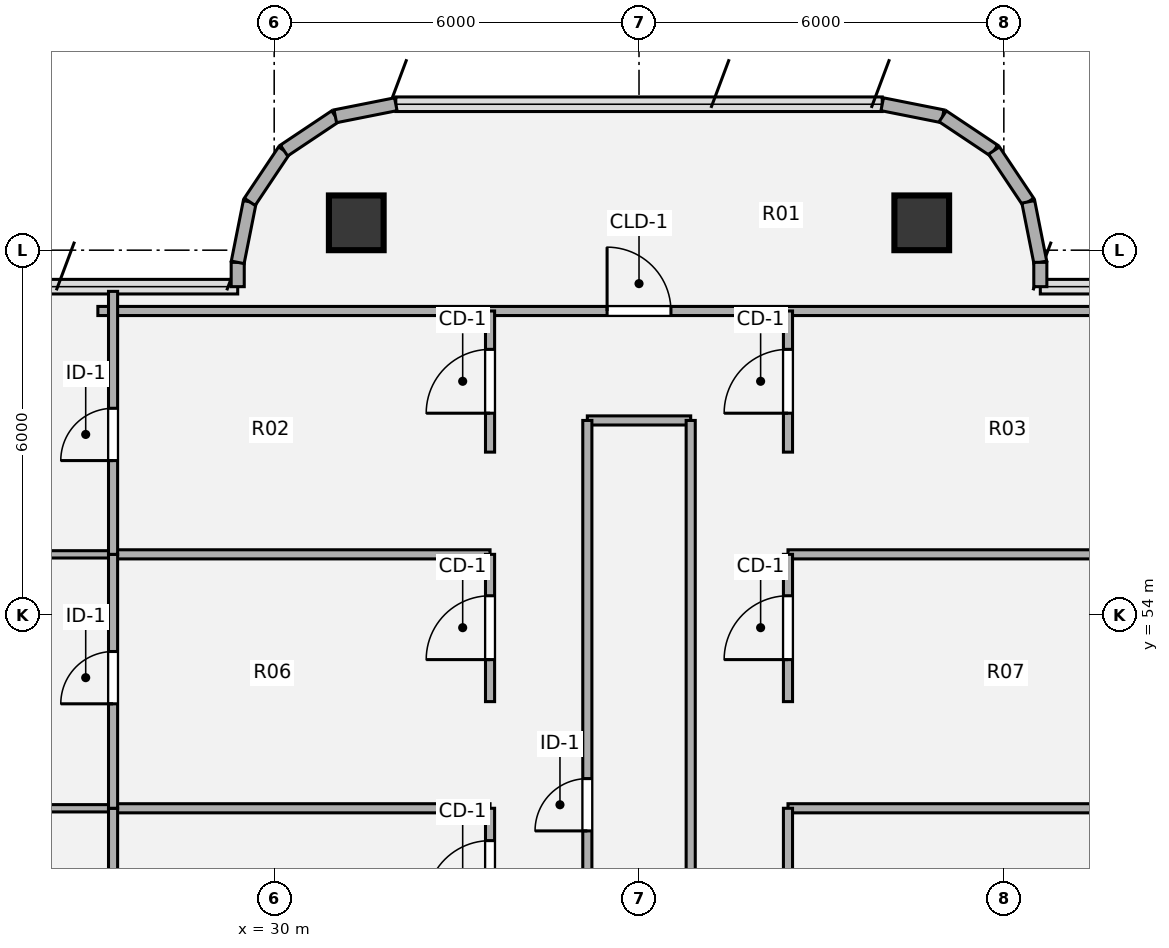
"""IFC4 building model, lengths in metres.
Left out: names, types, materials, properties, quantities, classifications, styles, units other than length and angle.
Written with IfcOpenShell. Run it as: python <this file> out.ifc"""

import sys

from ifc_helpers import new_model, si_unit, direction, frame, frame_2d, origin, origin_2d, place, context, subcontext, project, spatial, rectangle, hollow_circle, extrude, source, transform, mapped, element, fill, save


model = new_model("IFC4")
c1 = context("Model", 3, precision=1e-05, world=origin(), true_north=direction((0.0, 1.0)))
c2 = subcontext(c1, "Body", "Model", "MODEL_VIEW")
j1 = project(units=[si_unit("LENGTHUNIT", "METRE"), si_unit("PLANEANGLEUNIT", "RADIAN")], contexts=[c1])
p1 = place(None, origin())
s1 = spatial("IfcSite", under=j1, at=p1, CompositionType="ELEMENT")
p2 = place(p1, origin())
s2 = spatial("IfcBuilding", under=s1, at=p2, CompositionType="ELEMENT")
p3 = place(p2, frame((0.0, 0.0, 260.82)))
s3 = spatial("IfcBuildingStorey", under=s2, at=p3, CompositionType="ELEMENT", Elevation=260.82)
m1 = source(origin(), c2, "Body", "SweptSolid", [
    extrude(hollow_circle(Radius=0.45, WallThickness=0.032, at=origin_2d()), origin(), (0.0, 0.0, 1.0), 3.78),
])
for number, where, z_axis, x_axis in (
    (1, (31.35, 60.45, 0.0), (0.0, 0.0, 1.0), (1.0, 0.0, 0.0)),
    (2, (40.65, 60.45, 0.0), (0.0, 0.0, 1.0), (1.0, 0.0, 0.0)),
):
    element("IfcColumn", number, at=place(p3, frame(where, z_axis=z_axis, x_axis=x_axis)), inside=s3, PredefinedType="COLUMN", context=c2, shape_type="MappedRepresentation", body=[
        mapped(m1, transform((0.0, 0.0, 0.0), x_axis=(1.0, 0.0, 0.0), y_axis=(0.0, 1.0, 0.0), z_axis=(0.0, 0.0, 1.0), scale=1.0)),
    ])
p4 = place(p3, frame((29.4, 59.4, 0.0), z_axis=(0.0, 0.0, 1.0), x_axis=(0.0, 1.0, 0.0)))
e3 = element("IfcWall", 3, at=p4, inside=s3, PredefinedType="SOLIDWALL", context=c2, shape_type="SweptSolid", body=[
    extrude(rectangle(XDim=0.4, YDim=0.215, at=frame_2d((0.2, 0.0))), origin(), (0.0, 0.0, 1.0), 3.53),
])
p5 = place(p3, frame((29.4, 59.8, 0.0), z_axis=(0.0, 0.0, 1.0), x_axis=(0.195190360752, 0.980765376158, 0.0)))
e4 = element("IfcWall", 4, at=p5, inside=s3, PredefinedType="SOLIDWALL", context=c2, shape_type="SweptSolid", body=[
    extrude(rectangle(XDim=1.014, YDim=0.215, at=frame_2d((0.507, 0.0))), origin(), (0.0, 0.0, 1.0), 3.53),
])
p6 = place(p3, frame((29.598, 60.795, 0.0), z_axis=(0.0, 0.0, 1.0), x_axis=(0.555643898837, 0.831420385657, 0.0)))
e5 = element("IfcWall", 5, at=p6, inside=s3, PredefinedType="SOLIDWALL", context=c2, shape_type="SweptSolid", body=[
    extrude(rectangle(XDim=1.015, YDim=0.215, at=frame_2d((0.507, 0.0))), origin(), (0.0, 0.0, 1.0), 3.53),
])
p7 = place(p3, frame((30.162, 61.638, 0.0), z_axis=(0.0, 0.0, 1.0), x_axis=(0.831346067305, 0.555755086685, 0.0)))
e6 = element("IfcWall", 6, at=p7, inside=s3, PredefinedType="SOLIDWALL", context=c2, shape_type="SweptSolid", body=[
    extrude(rectangle(XDim=1.014, YDim=0.215, at=frame_2d((0.507, 0.0))), origin(), (0.0, 0.0, 1.0), 3.53),
])
for number, where, z_axis, x_axis in (
    (7, (31.005, 62.202, 0.0), (0.0, 0.0, 1.0), (0.981, 0.195, 0.0)),
    (8, (40.0, 62.4, 0.0), (0.0, 0.0, 1.0), (0.981, -0.195, 0.0)),
):
    element("IfcWall", number, at=place(p3, frame(where, z_axis=z_axis, x_axis=x_axis)), inside=s3, PredefinedType="SOLIDWALL", context=c2, shape_type="SweptSolid", body=[
        extrude(rectangle(XDim=1.015, YDim=0.215, at=frame_2d((0.507, 0.0))), origin(), (0.0, 0.0, 1.0), 3.53),
    ])
p8 = place(p3, frame((40.995, 62.202, 0.0), z_axis=(0.0, 0.0, 1.0), x_axis=(0.831346067305, -0.555755086685, 0.0)))
e9 = element("IfcWall", 9, at=p8, inside=s3, PredefinedType="SOLIDWALL", context=c2, shape_type="SweptSolid", body=[
    extrude(rectangle(XDim=1.014, YDim=0.215, at=frame_2d((0.507, 0.0))), origin(), (0.0, 0.0, 1.0), 3.53),
])
p9 = place(p3, frame((41.838, 61.638, 0.0), z_axis=(0.0, 0.0, 1.0), x_axis=(0.555643898837, -0.831420385657, 0.0)))
e10 = element("IfcWall", 10, at=p9, inside=s3, PredefinedType="SOLIDWALL", context=c2, shape_type="SweptSolid", body=[
    extrude(rectangle(XDim=1.015, YDim=0.215, at=frame_2d((0.507, 0.0))), origin(), (0.0, 0.0, 1.0), 3.53),
])
p10 = place(p3, frame((42.402, 60.795, 0.0), z_axis=(0.0, 0.0, 1.0), x_axis=(0.195190360752, -0.980765376158, 0.0)))
e11 = element("IfcWall", 11, at=p10, inside=s3, PredefinedType="SOLIDWALL", context=c2, shape_type="SweptSolid", body=[
    extrude(rectangle(XDim=1.014, YDim=0.215, at=frame_2d((0.507, 0.0))), origin(), (0.0, 0.0, 1.0), 3.53),
])
p11 = place(p3, frame((42.6, 59.8, 0.0), z_axis=(0.0, 0.0, 1.0), x_axis=(0.0, -1.0, 0.0)))
e12 = element("IfcWall", 12, at=p11, inside=s3, PredefinedType="SOLIDWALL", context=c2, shape_type="SweptSolid", body=[
    extrude(rectangle(XDim=0.4, YDim=0.215, at=frame_2d((0.2, 0.0))), origin(), (0.0, 0.0, 1.0), 3.53),
])
p12 = place(p3, frame((17.78, 50.822, 0.0), z_axis=(0.0, 0.0, 1.0), x_axis=(1.0, 0.0, 0.0)))
e13 = element("IfcWall", 13, at=p12, inside=s3, PredefinedType="PARTITIONING", context=c2, shape_type="SweptSolid", body=[
    extrude(rectangle(XDim=9.57, YDim=0.12, at=frame_2d((4.785, 0.0))), origin(), (0.0, 0.0, 1.0), 2.982),
])
p13 = place(p3, frame((27.35, 50.822, 0.0), z_axis=(0.0, 0.0, 1.0), x_axis=(1.0, 0.0, 0.0)))
e14 = element("IfcWall", 14, at=p13, inside=s3, PredefinedType="PARTITIONING", context=c2, shape_type="SweptSolid", body=[
    extrude(rectangle(XDim=6.2, YDim=0.15, at=frame_2d((3.1, 0.0))), origin(), (0.0, 0.0, 1.0), 2.982),
])
p14 = place(p3, frame((38.45, 50.822, 0.0), z_axis=(0.0, 0.0, 1.0), x_axis=(1.0, 0.0, 0.0)))
e15 = element("IfcWall", 15, at=p14, inside=s3, PredefinedType="PARTITIONING", context=c2, shape_type="SweptSolid", body=[
    extrude(rectangle(XDim=15.77, YDim=0.15, at=frame_2d((7.885, 0.0))), origin(), (0.0, 0.0, 1.0), 2.982),
])
p15 = place(p3, frame((17.78, 54.998, 0.0), z_axis=(0.0, 0.0, 1.0), x_axis=(1.0, 0.0, 0.0)))
e16 = element("IfcWall", 16, at=p15, inside=s3, PredefinedType="PARTITIONING", context=c2, shape_type="SweptSolid", body=[
    extrude(rectangle(XDim=9.57, YDim=0.12, at=frame_2d((4.785, 0.0))), origin(), (0.0, 0.0, 1.0), 3.5),
])
for number, where, z_axis, x_axis in (
    (17, (27.35, 54.998, 0.0), (0.0, 0.0, 1.0), (1.0, 0.0, 0.0)),
    (18, (38.45, 54.998, 0.0), (0.0, 0.0, 1.0), (1.0, 0.0, 0.0)),
):
    element("IfcWall", number, at=place(p3, frame(where, z_axis=z_axis, x_axis=x_axis)), inside=s3, PredefinedType="PARTITIONING", context=c2, shape_type="SweptSolid", body=[
        extrude(rectangle(XDim=6.2, YDim=0.15, at=frame_2d((3.1, 0.0))), origin(), (0.0, 0.0, 1.0), 3.259),
    ])
p16 = place(p3, frame((35.15, 57.2, 0.0), z_axis=(0.0, 0.0, 1.0), x_axis=(1.0, 0.0, 0.0)))
e19 = element("IfcWall", 19, at=p16, inside=s3, PredefinedType="PARTITIONING", context=c2, shape_type="SweptSolid", body=[
    extrude(rectangle(XDim=1.7, YDim=0.15, at=frame_2d((0.85, 0.0))), origin(), (0.0, 0.0, 1.0), 3.308),
])
p17 = place(p3, frame((27.1, 59.0, 0.0), z_axis=(0.0, 0.0, 1.0), x_axis=(1.0, 0.0, 0.0)))
e20 = element("IfcWall", 20, at=p17, inside=s3, PredefinedType="PARTITIONING", context=c2, shape_type="SweptSolid", body=[
    extrude(rectangle(XDim=17.8, YDim=0.15, at=frame_2d((8.9, 0.0))), origin(), (0.0, 0.0, 1.0), 3.308),
])
p18 = place(p17, frame((8.375, 0.0, 0.0)))
e21 = element("IfcOpeningElement", 21, at=p18, cuts=e20, PredefinedType="OPENING", context=c2, shape_type="SweptSolid", body=[
    extrude(rectangle(XDim=1.05, YDim=2.1, at=origin_2d()), frame((0.525, 0.085, 1.05), z_axis=(0.0, -1.0, 0.0), x_axis=(1.0, 0.0, 0.0)), (0.0, 0.0, 1.0), 0.17),
])
p19 = place(p3, frame((27.35, 46.298, 0.0), z_axis=(0.0, 0.0, 1.0), x_axis=(0.0, 1.0, 0.0)))
e22 = element("IfcWall", 22, at=p19, inside=s3, PredefinedType="PARTITIONING", context=c2, shape_type="SweptSolid", body=[
    extrude(rectangle(XDim=4.524, YDim=0.15, at=frame_2d((2.262, 0.0))), origin(), (0.0, 0.0, 1.0), 3.5),
])
p20 = place(p19, frame((1.742, 0.0, 0.0)))
e23 = element("IfcOpeningElement", 23, at=p20, cuts=e22, PredefinedType="OPENING", context=c2, shape_type="SweptSolid", body=[
    extrude(rectangle(XDim=0.86, YDim=2.1, at=origin_2d()), frame((0.43, 0.085, 1.05), z_axis=(0.0, -1.0, 0.0), x_axis=(1.0, 0.0, 0.0)), (0.0, 0.0, 1.0), 0.17),
])
p21 = place(p3, frame((27.35, 50.822, 0.0), z_axis=(0.0, 0.0, 1.0), x_axis=(0.0, 1.0, 0.0)))
e24 = element("IfcWall", 24, at=p21, inside=s3, PredefinedType="PARTITIONING", context=c2, shape_type="SweptSolid", body=[
    extrude(rectangle(XDim=4.176, YDim=0.15, at=frame_2d((2.088, 0.0))), origin(), (0.0, 0.0, 1.0), 3.5),
])
p22 = place(p21, frame((1.718, 0.0, 0.0)))
e25 = element("IfcOpeningElement", 25, at=p22, cuts=e24, PredefinedType="OPENING", context=c2, shape_type="SweptSolid", body=[
    extrude(rectangle(XDim=0.86, YDim=2.1, at=origin_2d()), frame((0.43, 0.085, 1.05), z_axis=(0.0, -1.0, 0.0), x_axis=(1.0, 0.0, 0.0)), (0.0, 0.0, 1.0), 0.17),
])
p23 = place(p3, frame((27.35, 54.998, 0.0), z_axis=(0.0, 0.0, 1.0), x_axis=(0.0, 1.0, 0.0)))
e26 = element("IfcWall", 26, at=p23, inside=s3, PredefinedType="PARTITIONING", context=c2, shape_type="SweptSolid", body=[
    extrude(rectangle(XDim=4.324, YDim=0.15, at=frame_2d((2.162, 0.0))), origin(), (0.0, 0.0, 1.0), 3.5),
])
p24 = place(p23, frame((1.542, 0.0, 0.0)))
e27 = element("IfcOpeningElement", 27, at=p24, cuts=e26, PredefinedType="OPENING", context=c2, shape_type="SweptSolid", body=[
    extrude(rectangle(XDim=0.86, YDim=2.1, at=origin_2d()), frame((0.43, 0.085, 1.05), z_axis=(0.0, -1.0, 0.0), x_axis=(1.0, 0.0, 0.0)), (0.0, 0.0, 1.0), 0.17),
])
p25 = place(p3, frame((33.55, 48.698, 0.0), z_axis=(0.0, 0.0, 1.0), x_axis=(0.0, 1.0, 0.0)))
e28 = element("IfcWall", 28, at=p25, inside=s3, PredefinedType="PARTITIONING", context=c2, shape_type="SweptSolid", body=[
    extrude(rectangle(XDim=2.124, YDim=0.15, at=frame_2d((1.062, 0.0))), origin(), (0.0, 0.0, 1.0), 3.5),
])
p26 = place(p25, frame((0.542, 0.0, 0.0)))
e29 = element("IfcOpeningElement", 29, at=p26, cuts=e28, PredefinedType="OPENING", context=c2, shape_type="SweptSolid", body=[
    extrude(rectangle(XDim=1.05, YDim=2.1, at=origin_2d()), frame((0.525, 0.085, 1.05), z_axis=(0.0, -1.0, 0.0), x_axis=(1.0, 0.0, 0.0)), (0.0, 0.0, 1.0), 0.17),
])
p27 = place(p3, frame((33.55, 52.576, 0.0), z_axis=(0.0, 0.0, 1.0), x_axis=(0.0, 1.0, 0.0)))
e30 = element("IfcWall", 30, at=p27, inside=s3, PredefinedType="PARTITIONING", context=c2, shape_type="SweptSolid", body=[
    extrude(rectangle(XDim=2.422, YDim=0.15, at=frame_2d((1.211, 0.0))), origin(), (0.0, 0.0, 1.0), 3.5),
])
p28 = place(p27, frame((0.691, 0.0, 0.0)))
e31 = element("IfcOpeningElement", 31, at=p28, cuts=e30, PredefinedType="OPENING", context=c2, shape_type="SweptSolid", body=[
    extrude(rectangle(XDim=1.05, YDim=2.1, at=origin_2d()), frame((0.525, 0.085, 1.05), z_axis=(0.0, -1.0, 0.0), x_axis=(1.0, 0.0, 0.0)), (0.0, 0.0, 1.0), 0.17),
])
p29 = place(p3, frame((33.55, 56.679, 0.0), z_axis=(0.0, 0.0, 1.0), x_axis=(0.0, 1.0, 0.0)))
e32 = element("IfcWall", 32, at=p29, inside=s3, PredefinedType="PARTITIONING", context=c2, shape_type="SweptSolid", body=[
    extrude(rectangle(XDim=2.321, YDim=0.15, at=frame_2d((1.161, 0.0))), origin(), (0.0, 0.0, 1.0), 3.5),
])
p30 = place(p29, frame((0.64, 0.0, 0.0)))
e33 = element("IfcOpeningElement", 33, at=p30, cuts=e32, PredefinedType="OPENING", context=c2, shape_type="SweptSolid", body=[
    extrude(rectangle(XDim=1.05, YDim=2.1, at=origin_2d()), frame((0.525, 0.085, 1.05), z_axis=(0.0, -1.0, 0.0), x_axis=(1.0, 0.0, 0.0)), (0.0, 0.0, 1.0), 0.17),
])
p31 = place(p3, frame((35.15, 44.62, 0.0), z_axis=(0.0, 0.0, 1.0), x_axis=(0.0, 1.0, 0.0)))
e34 = element("IfcWall", 34, at=p31, inside=s3, PredefinedType="PARTITIONING", context=c2, shape_type="SweptSolid", body=[
    extrude(rectangle(XDim=12.58, YDim=0.15, at=frame_2d((6.29, 0.0))), origin(), (0.0, 0.0, 1.0), 3.5),
])
p32 = place(p31, frame((5.83, 0.0, 0.0)))
e35 = element("IfcOpeningElement", 35, at=p32, cuts=e34, PredefinedType="OPENING", context=c2, shape_type="SweptSolid", body=[
    extrude(rectangle(XDim=0.86, YDim=2.1, at=origin_2d()), frame((0.43, 0.085, 1.05), z_axis=(0.0, -1.0, 0.0), x_axis=(1.0, 0.0, 0.0)), (0.0, 0.0, 1.0), 0.17),
])
p33 = place(p3, frame((36.85, 44.62, 0.0), z_axis=(0.0, 0.0, 1.0), x_axis=(0.0, 1.0, 0.0)))
e36 = element("IfcWall", 36, at=p33, inside=s3, PredefinedType="PARTITIONING", context=c2, shape_type="SweptSolid", body=[
    extrude(rectangle(XDim=12.58, YDim=0.15, at=frame_2d((6.29, 0.0))), origin(), (0.0, 0.0, 1.0), 3.5),
])
p34 = place(p3, frame((38.45, 46.298, 0.0), z_axis=(0.0, 0.0, 1.0), x_axis=(0.0, 1.0, 0.0)))
e37 = element("IfcWall", 37, at=p34, inside=s3, PredefinedType="PARTITIONING", context=c2, shape_type="SweptSolid", body=[
    extrude(rectangle(XDim=4.524, YDim=0.15, at=frame_2d((2.262, 0.0))), origin(), (0.0, 0.0, 1.0), 3.5),
])
p35 = place(p34, frame((1.737, 0.0, 0.0)))
e38 = element("IfcOpeningElement", 38, at=p35, cuts=e37, PredefinedType="OPENING", context=c2, shape_type="SweptSolid", body=[
    extrude(rectangle(XDim=1.05, YDim=2.1, at=origin_2d()), frame((0.525, 0.085, 1.05), z_axis=(0.0, -1.0, 0.0), x_axis=(1.0, 0.0, 0.0)), (0.0, 0.0, 1.0), 0.17),
])
p36 = place(p3, frame((38.45, 52.576, 0.0), z_axis=(0.0, 0.0, 1.0), x_axis=(0.0, 1.0, 0.0)))
e39 = element("IfcWall", 39, at=p36, inside=s3, PredefinedType="PARTITIONING", context=c2, shape_type="SweptSolid", body=[
    extrude(rectangle(XDim=2.422, YDim=0.15, at=frame_2d((1.211, 0.0))), origin(), (0.0, 0.0, 1.0), 3.5),
])
p37 = place(p36, frame((0.691, 0.0, 0.0)))
e40 = element("IfcOpeningElement", 40, at=p37, cuts=e39, PredefinedType="OPENING", context=c2, shape_type="SweptSolid", body=[
    extrude(rectangle(XDim=1.05, YDim=2.1, at=origin_2d()), frame((0.525, 0.085, 1.05), z_axis=(0.0, -1.0, 0.0), x_axis=(1.0, 0.0, 0.0)), (0.0, 0.0, 1.0), 0.17),
])
p38 = place(p3, frame((38.45, 56.679, 0.0), z_axis=(0.0, 0.0, 1.0), x_axis=(0.0, 1.0, 0.0)))
e41 = element("IfcWall", 41, at=p38, inside=s3, PredefinedType="PARTITIONING", context=c2, shape_type="SweptSolid", body=[
    extrude(rectangle(XDim=2.321, YDim=0.15, at=frame_2d((1.161, 0.0))), origin(), (0.0, 0.0, 1.0), 3.5),
])
p39 = place(p38, frame((0.64, 0.0, 0.0)))
e42 = element("IfcOpeningElement", 42, at=p39, cuts=e41, PredefinedType="OPENING", context=c2, shape_type="SweptSolid", body=[
    extrude(rectangle(XDim=1.05, YDim=2.1, at=origin_2d()), frame((0.525, 0.085, 1.05), z_axis=(0.0, -1.0, 0.0), x_axis=(1.0, 0.0, 0.0)), (0.0, 0.0, 1.0), 0.17),
])
m2 = source(origin(), c2, "Body", "SweptSolid", [
    extrude(rectangle(XDim=1.05, YDim=2.1, at=origin_2d()), frame((0.525, 0.025, 1.05), z_axis=(0.0, -1.0, 0.0), x_axis=(1.0, 0.0, 0.0)), (0.0, 0.0, 1.0), 0.05),
])
p40 = place(p18, origin())
e43 = element("IfcDoor", 43, at=p40, inside=s3, OperationType="SINGLE_SWING_LEFT", PredefinedType="DOOR", context=c2, shape_type="MappedRepresentation", body=[
    mapped(m2, transform((0.0, 0.0, 0.0), x_axis=(1.0, 0.0, 0.0), y_axis=(0.0, 1.0, 0.0), z_axis=(0.0, 0.0, 1.0), scale=1.0)),
])
fill(e21, e43)
m3 = source(origin(), c2, "Body", "SweptSolid", [
    extrude(rectangle(XDim=0.86, YDim=2.1, at=origin_2d()), frame((0.43, 0.025, 1.05), z_axis=(0.0, -1.0, 0.0), x_axis=(1.0, 0.0, 0.0)), (0.0, 0.0, 1.0), 0.05),
])
p41 = place(p22, origin())
e44 = element("IfcDoor", 44, at=p41, inside=s3, OperationType="SINGLE_SWING_LEFT", PredefinedType="DOOR", context=c2, shape_type="MappedRepresentation", body=[
    mapped(m3, transform((0.0, 0.0, 0.0), x_axis=(1.0, 0.0, 0.0), y_axis=(0.0, 1.0, 0.0), z_axis=(0.0, 0.0, 1.0), scale=1.0)),
])
fill(e25, e44)
p42 = place(p24, origin())
e45 = element("IfcDoor", 45, at=p42, inside=s3, OperationType="SINGLE_SWING_LEFT", PredefinedType="DOOR", context=c2, shape_type="MappedRepresentation", body=[
    mapped(m3, transform((0.0, 0.0, 0.0), x_axis=(1.0, 0.0, 0.0), y_axis=(0.0, 1.0, 0.0), z_axis=(0.0, 0.0, 1.0), scale=1.0)),
])
fill(e27, e45)
m4 = source(origin(), c2, "Body", "SweptSolid", [
    extrude(rectangle(XDim=1.05, YDim=2.1, at=origin_2d()), frame((0.525, 0.025, 1.05), z_axis=(0.0, -1.0, 0.0), x_axis=(1.0, 0.0, 0.0)), (0.0, 0.0, 1.0), 0.05),
])
p43 = place(p26, origin())
e46 = element("IfcDoor", 46, at=p43, inside=s3, OperationType="SINGLE_SWING_LEFT", PredefinedType="DOOR", context=c2, shape_type="MappedRepresentation", body=[
    mapped(m4, transform((0.0, 0.0, 0.0), x_axis=(1.0, 0.0, 0.0), y_axis=(0.0, 1.0, 0.0), z_axis=(0.0, 0.0, 1.0), scale=1.0)),
])
fill(e29, e46)
p44 = place(p28, origin())
e47 = element("IfcDoor", 47, at=p44, inside=s3, OperationType="SINGLE_SWING_LEFT", PredefinedType="DOOR", context=c2, shape_type="MappedRepresentation", body=[
    mapped(m4, transform((0.0, 0.0, 0.0), x_axis=(1.0, 0.0, 0.0), y_axis=(0.0, 1.0, 0.0), z_axis=(0.0, 0.0, 1.0), scale=1.0)),
])
fill(e31, e47)
p45 = place(p30, origin())
e48 = element("IfcDoor", 48, at=p45, inside=s3, OperationType="SINGLE_SWING_LEFT", PredefinedType="DOOR", context=c2, shape_type="MappedRepresentation", body=[
    mapped(m4, transform((0.0, 0.0, 0.0), x_axis=(1.0, 0.0, 0.0), y_axis=(0.0, 1.0, 0.0), z_axis=(0.0, 0.0, 1.0), scale=1.0)),
])
fill(e33, e48)
p46 = place(p32, origin())
e49 = element("IfcDoor", 49, at=p46, inside=s3, OperationType="SINGLE_SWING_LEFT", PredefinedType="DOOR", context=c2, shape_type="MappedRepresentation", body=[
    mapped(m3, transform((0.0, 0.0, 0.0), x_axis=(1.0, 0.0, 0.0), y_axis=(0.0, 1.0, 0.0), z_axis=(0.0, 0.0, 1.0), scale=1.0)),
])
fill(e35, e49)
p47 = place(p37, origin())
e50 = element("IfcDoor", 50, at=p47, inside=s3, OperationType="SINGLE_SWING_LEFT", PredefinedType="DOOR", context=c2, shape_type="MappedRepresentation", body=[
    mapped(m4, transform((0.0, 0.0, 0.0), x_axis=(1.0, 0.0, 0.0), y_axis=(0.0, 1.0, 0.0), z_axis=(0.0, 0.0, 1.0), scale=1.0)),
])
fill(e40, e50)
p48 = place(p39, origin())
e51 = element("IfcDoor", 51, at=p48, inside=s3, OperationType="SINGLE_SWING_LEFT", PredefinedType="DOOR", context=c2, shape_type="MappedRepresentation", body=[
    mapped(m4, transform((0.0, 0.0, 0.0), x_axis=(1.0, 0.0, 0.0), y_axis=(0.0, 1.0, 0.0), z_axis=(0.0, 0.0, 1.0), scale=1.0)),
])
fill(e42, e51)
save(model, sys.argv[1])
